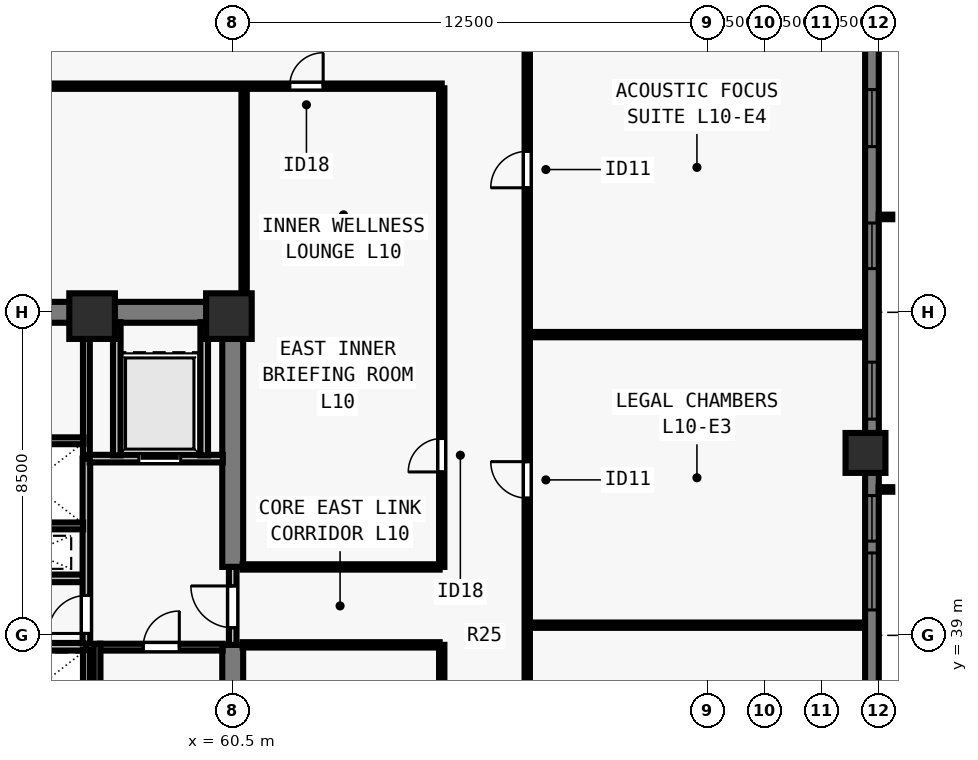
"""IFC4 building model, lengths in metres.
Left out: names, types, materials, properties, quantities, classifications, styles, units other than length and angle.
Written with IfcOpenShell. Run it as: python <this file> out.ifc"""

import sys

from ifc_helpers import new_model, si_unit, direction, frame, frame_2d, origin, origin_2d, place, context, subcontext, project, spatial, rectangle, extrude, element, fill, save


model = new_model("IFC4")
c1 = context("Model", 3, precision=1e-05, world=origin(), true_north=direction((0.0, 1.0)))
c2 = subcontext(c1, "Body", "Model", "MODEL_VIEW")
j1 = project(units=[si_unit("LENGTHUNIT", "METRE"), si_unit("PLANEANGLEUNIT", "RADIAN")], contexts=[c1])
p1 = place(None, origin())
s1 = spatial("IfcSite", under=j1, at=p1, CompositionType="ELEMENT")
p2 = place(p1, origin())
s2 = spatial("IfcBuilding", under=s1, at=p2, CompositionType="ELEMENT")
p3 = place(p2, frame((0.0, 0.0, 41.0)))
s3 = spatial("IfcBuildingStorey", under=s2, at=p3, CompositionType="ELEMENT", Elevation=41.0)
for number, where, z_axis, x_axis in (
    (1, (56.8, 47.4, 0.0), (0.0, 0.0, 1.0), (1.0, 0.0, 0.0)),
    (2, (60.4, 47.4, 0.0), (0.0, 0.0, 1.0), (1.0, 0.0, 0.0)),
):
    element("IfcColumn", number, at=place(p3, frame(where, z_axis=z_axis, x_axis=x_axis)), inside=s3, PredefinedType="COLUMN", context=c2, shape_type="SweptSolid", body=[
        extrude(rectangle(XDim=1.2, YDim=1.2, at=origin_2d()), origin(), (0.0, 0.0, 1.0), 3.5),
    ])
p4 = place(p3, frame((77.15, 43.8, 0.0), z_axis=(0.0, 0.0, 1.0), x_axis=(0.0, 1.0, 0.0)))
e3 = element("IfcColumn", 3, at=p4, inside=s3, PredefinedType="COLUMN", context=c2, shape_type="SweptSolid", body=[
    extrude(rectangle(XDim=1.05, YDim=1.05, at=origin_2d()), origin(), (0.0, 0.0, 1.0), 3.5),
])
p5 = place(p3, frame((77.32, 61.5, 0.0), z_axis=(0.0, 0.0, 1.0), x_axis=(0.0, -1.0, 0.0)))
e4 = element("IfcWall", 4, at=p5, inside=s3, PredefinedType="SOLIDWALL", context=c2, shape_type="SweptSolid", body=[
    extrude(rectangle(XDim=44.662, YDim=0.36, at=frame_2d((22.331, 0.0))), origin(), (0.0, 0.0, 1.0), 3.28),
])
p6 = place(p5, frame((4.93, 0.0, 0.8)))
e5 = element("IfcOpeningElement", 5, at=p6, cuts=e4, PredefinedType="OPENING", context=c2, shape_type="SweptSolid", body=[
    extrude(rectangle(XDim=1.2, YDim=1.544, at=frame_2d((0.6, 0.772))), frame((0.0, 0.19, 0.0), z_axis=(0.0, -1.0, 0.0), x_axis=(1.0, 0.0, 0.0)), (0.0, 0.0, 1.0), 0.38),
])
p7 = place(p5, frame((8.14, 0.0, 0.8)))
e6 = element("IfcOpeningElement", 6, at=p7, cuts=e4, PredefinedType="OPENING", context=c2, shape_type="SweptSolid", body=[
    extrude(rectangle(XDim=1.5, YDim=1.544, at=frame_2d((0.75, 0.772))), frame((0.0, 0.19, 0.0), z_axis=(0.0, -1.0, 0.0), x_axis=(1.0, 0.0, 0.0)), (0.0, 0.0, 1.0), 0.38),
])
p8 = place(p5, frame((11.65, 0.0, 0.8)))
e7 = element("IfcOpeningElement", 7, at=p8, cuts=e4, PredefinedType="OPENING", context=c2, shape_type="SweptSolid", body=[
    extrude(rectangle(XDim=1.2, YDim=1.544, at=frame_2d((0.6, 0.772))), frame((0.0, 0.19, 0.0), z_axis=(0.0, -1.0, 0.0), x_axis=(1.0, 0.0, 0.0)), (0.0, 0.0, 1.0), 0.38),
])
p9 = place(p5, frame((15.311, 0.0, 0.8)))
e8 = element("IfcOpeningElement", 8, at=p9, cuts=e4, PredefinedType="OPENING", context=c2, shape_type="SweptSolid", body=[
    extrude(rectangle(XDim=1.5, YDim=1.544, at=frame_2d((0.75, 0.772))), frame((0.0, 0.19, 0.0), z_axis=(0.0, -1.0, 0.0), x_axis=(1.0, 0.0, 0.0)), (0.0, 0.0, 1.0), 0.38),
])
p10 = place(p5, frame((18.821, 0.0, 0.8)))
e9 = element("IfcOpeningElement", 9, at=p10, cuts=e4, PredefinedType="OPENING", context=c2, shape_type="SweptSolid", body=[
    extrude(rectangle(XDim=1.2, YDim=1.544, at=frame_2d((0.6, 0.772))), frame((0.0, 0.19, 0.0), z_axis=(0.0, -1.0, 0.0), x_axis=(1.0, 0.0, 0.0)), (0.0, 0.0, 1.0), 0.38),
])
p11 = place(p5, frame((20.331, 0.0, 0.8)))
e10 = element("IfcOpeningElement", 10, at=p11, cuts=e4, PredefinedType="OPENING", context=c2, shape_type="SweptSolid", body=[
    extrude(rectangle(XDim=1.5, YDim=1.544, at=frame_2d((0.75, 0.772))), frame((0.0, 0.19, 0.0), z_axis=(0.0, -1.0, 0.0), x_axis=(1.0, 0.0, 0.0)), (0.0, 0.0, 1.0), 0.38),
])
p12 = place(p5, frame((25.091, 0.0, 0.8)))
e11 = element("IfcOpeningElement", 11, at=p12, cuts=e4, PredefinedType="OPENING", context=c2, shape_type="SweptSolid", body=[
    extrude(rectangle(XDim=1.2, YDim=1.544, at=frame_2d((0.6, 0.772))), frame((0.0, 0.19, 0.0), z_axis=(0.0, -1.0, 0.0), x_axis=(1.0, 0.0, 0.0)), (0.0, 0.0, 1.0), 0.38),
])
p13 = place(p5, frame((28.302, 0.0, 0.8)))
e12 = element("IfcOpeningElement", 12, at=p13, cuts=e4, PredefinedType="OPENING", context=c2, shape_type="SweptSolid", body=[
    extrude(rectangle(XDim=1.5, YDim=1.544, at=frame_2d((0.75, 0.772))), frame((0.0, 0.19, 0.0), z_axis=(0.0, -1.0, 0.0), x_axis=(1.0, 0.0, 0.0)), (0.0, 0.0, 1.0), 0.38),
])
p14 = place(p5, frame((31.812, 0.0, 0.8)))
e13 = element("IfcOpeningElement", 13, at=p14, cuts=e4, PredefinedType="OPENING", context=c2, shape_type="SweptSolid", body=[
    extrude(rectangle(XDim=1.2, YDim=1.544, at=frame_2d((0.6, 0.772))), frame((0.0, 0.19, 0.0), z_axis=(0.0, -1.0, 0.0), x_axis=(1.0, 0.0, 0.0)), (0.0, 0.0, 1.0), 0.38),
])
p15 = place(p5, frame((35.022, 0.0, 0.8)))
e14 = element("IfcOpeningElement", 14, at=p15, cuts=e4, PredefinedType="OPENING", context=c2, shape_type="SweptSolid", body=[
    extrude(rectangle(XDim=1.5, YDim=1.544, at=frame_2d((0.75, 0.772))), frame((0.0, 0.19, 0.0), z_axis=(0.0, -1.0, 0.0), x_axis=(1.0, 0.0, 0.0)), (0.0, 0.0, 1.0), 0.38),
])
p16 = place(p5, frame((38.532, 0.0, 0.8)))
e15 = element("IfcOpeningElement", 15, at=p16, cuts=e4, PredefinedType="OPENING", context=c2, shape_type="SweptSolid", body=[
    extrude(rectangle(XDim=1.2, YDim=1.544, at=frame_2d((0.6, 0.772))), frame((0.0, 0.19, 0.0), z_axis=(0.0, -1.0, 0.0), x_axis=(1.0, 0.0, 0.0)), (0.0, 0.0, 1.0), 0.38),
])
p17 = place(p3, frame((43.225, 47.5, 0.0), z_axis=(0.0, 0.0, 1.0), x_axis=(1.0, 0.0, 0.0)))
e16 = element("IfcWall", 16, at=p17, inside=s3, PredefinedType="SHEAR", context=c2, shape_type="SweptSolid", body=[
    extrude(rectangle(XDim=17.55, YDim=0.55, at=frame_2d((8.775, 0.0))), origin(), (0.0, 0.0, 1.0), 3.28),
])
p18 = place(p3, frame((60.5, 30.765, 0.0), z_axis=(0.0, 0.0, 1.0), x_axis=(0.0, 1.0, 0.0)))
e17 = element("IfcWall", 17, at=p18, inside=s3, PredefinedType="SHEAR", context=c2, shape_type="SweptSolid", body=[
    extrude(rectangle(XDim=7.985, YDim=0.55, at=frame_2d((3.993, 0.0))), origin(), (0.0, 0.0, 1.0), 3.28),
])
p19 = place(p3, frame((60.5, 40.8, 0.0), z_axis=(0.0, 0.0, 1.0), x_axis=(0.0, 1.0, 0.0)))
e18 = element("IfcWall", 18, at=p19, inside=s3, PredefinedType="SHEAR", context=c2, shape_type="SweptSolid", body=[
    extrude(rectangle(XDim=6.435, YDim=0.55, at=frame_2d((3.218, 0.0))), origin(), (0.0, 0.0, 1.0), 3.28),
])
for number, where, z_axis, x_axis in (
    (19, (53.7, 38.7, 0.0), (0.0, 0.0, 1.0), (1.0, 0.0, 0.0)),
    (20, (53.7, 40.5, 0.0), (0.0, 0.0, 1.0), (1.0, 0.0, 0.0)),
):
    element("IfcWall", number, at=place(p3, frame(where, z_axis=z_axis, x_axis=x_axis)), inside=s3, PredefinedType="SOLIDWALL", context=c2, shape_type="SweptSolid", body=[
        extrude(rectangle(XDim=2.95, YDim=0.2, at=frame_2d((1.475, 0.0))), origin(), (0.0, 0.0, 1.0), 3.28),
    ])
p20 = place(p3, frame((60.5, 38.75, 0.0), z_axis=(0.0, 0.0, 1.0), x_axis=(0.0, 1.0, 0.0)))
e21 = element("IfcWall", 21, at=p20, inside=s3, PredefinedType="SOLIDWALL", context=c2, shape_type="SweptSolid", body=[
    extrude(rectangle(XDim=2.05, YDim=0.2, at=frame_2d((1.025, 0.0))), origin(), (0.0, 0.0, 1.0), 3.28),
])
p21 = place(p20, frame((0.45, 0.0, 0.0)))
e22 = element("IfcOpeningElement", 22, at=p21, cuts=e21, PredefinedType="OPENING", context=c2, shape_type="SweptSolid", body=[
    extrude(rectangle(XDim=1.1, YDim=2.15, at=frame_2d((0.55, 1.075))), frame((0.0, 0.11, 0.0), z_axis=(0.0, -1.0, 0.0), x_axis=(1.0, 0.0, 0.0)), (0.0, 0.0, 1.0), 0.22),
])
p22 = place(p3, frame((56.65, 38.785, 0.0), z_axis=(0.0, 0.0, 1.0), x_axis=(0.0, 1.0, 0.0)))
e23 = element("IfcWall", 23, at=p22, inside=s3, PredefinedType="SOLIDWALL", context=c2, shape_type="SweptSolid", body=[
    extrude(rectangle(XDim=4.865, YDim=0.2, at=frame_2d((2.433, 0.0))), origin(), (0.0, 0.0, 1.0), 3.28),
])
p23 = place(p22, frame((0.265, 0.0, 0.0)))
e24 = element("IfcOpeningElement", 24, at=p23, cuts=e23, PredefinedType="OPENING", context=c2, shape_type="SweptSolid", body=[
    extrude(rectangle(XDim=1.0, YDim=2.15, at=frame_2d((0.5, 1.075))), frame((0.0, 0.11, 0.0), z_axis=(0.0, -1.0, 0.0), x_axis=(1.0, 0.0, 0.0)), (0.0, 0.0, 1.0), 0.22),
])
p24 = place(p3, frame((56.735, 43.65, 0.0), z_axis=(0.0, 0.0, 1.0), x_axis=(1.0, 0.0, 0.0)))
e25 = element("IfcWall", 25, at=p24, inside=s3, PredefinedType="SOLIDWALL", context=c2, shape_type="SweptSolid", body=[
    extrude(rectangle(XDim=3.505, YDim=0.2, at=frame_2d((1.752, 0.0))), origin(), (0.0, 0.0, 1.0), 3.28),
])
p25 = place(p24, frame((1.295, 0.0, 0.0)))
e26 = element("IfcOpeningElement", 26, at=p25, cuts=e25, PredefinedType="OPENING", context=c2, shape_type="SweptSolid", body=[
    extrude(rectangle(XDim=1.1, YDim=2.2, at=frame_2d((0.55, 1.1))), frame((0.0, 0.11, 0.0), z_axis=(0.0, -1.0, 0.0), x_axis=(1.0, 0.0, 0.0)), (0.0, 0.0, 1.0), 0.22),
])
for number, where, z_axis, x_axis in (
    (27, (57.45, 43.735, 0.0), (0.0, 0.0, 1.0), (0.0, 1.0, 0.0)),
    (28, (59.75, 43.735, 0.0), (0.0, 0.0, 1.0), (0.0, 1.0, 0.0)),
):
    element("IfcWall", number, at=place(p3, frame(where, z_axis=z_axis, x_axis=x_axis)), inside=s3, PredefinedType="SOLIDWALL", context=c2, shape_type="SweptSolid", body=[
        extrude(rectangle(XDim=3.505, YDim=0.2, at=frame_2d((1.752, 0.0))), origin(), (0.0, 0.0, 1.0), 3.28),
    ])
p26 = place(p3, frame((56.65, 30.76, 0.0), z_axis=(0.0, 0.0, 1.0), x_axis=(0.0, 1.0, 0.0)))
e29 = element("IfcWall", 29, at=p26, inside=s3, PredefinedType="SOLIDWALL", context=c2, shape_type="SweptSolid", body=[
    extrude(rectangle(XDim=7.855, YDim=0.18, at=frame_2d((3.927, 0.0))), origin(), (0.0, 0.0, 1.0), 3.28),
])
p27 = place(p3, frame((56.65, 43.735, 0.0), z_axis=(0.0, 0.0, 1.0), x_axis=(0.0, 1.0, 0.0)))
e30 = element("IfcWall", 30, at=p27, inside=s3, PredefinedType="SOLIDWALL", context=c2, shape_type="SweptSolid", body=[
    extrude(rectangle(XDim=3.505, YDim=0.18, at=frame_2d((1.752, 0.0))), origin(), (0.0, 0.0, 1.0), 3.28),
])
p28 = place(p3, frame((53.785, 41.88, 0.0), z_axis=(0.0, 0.0, 1.0), x_axis=(1.0, 0.0, 0.0)))
e31 = element("IfcWall", 31, at=p28, inside=s3, PredefinedType="SOLIDWALL", context=c2, shape_type="SweptSolid", body=[
    extrude(rectangle(XDim=2.78, YDim=0.18, at=frame_2d((1.39, 0.0))), origin(), (0.0, 0.0, 1.0), 3.28),
])
p29 = place(p3, frame((53.785, 44.12, 0.0), z_axis=(0.0, 0.0, 1.0), x_axis=(1.0, 0.0, 0.0)))
e32 = element("IfcWall", 32, at=p29, inside=s3, PredefinedType="SOLIDWALL", context=c2, shape_type="SweptSolid", body=[
    extrude(rectangle(XDim=2.79, YDim=0.18, at=frame_2d((1.395, 0.0))), origin(), (0.0, 0.0, 1.0), 3.28),
])
p30 = place(p3, frame((68.25, 22.355, 0.0), z_axis=(0.0, 0.0, 1.0), x_axis=(0.0, 1.0, 0.0)))
e33 = element("IfcWall", 33, at=p30, inside=s3, PredefinedType="PARTITIONING", context=c2, shape_type="SweptSolid", body=[
    extrude(rectangle(XDim=33.29, YDim=0.14, at=frame_2d((16.645, 0.0))), origin(), (0.0, 0.0, 1.0), 3.28),
])
p31 = place(p30, frame((3.522, 0.0, 0.0)))
e34 = element("IfcOpeningElement", 34, at=p31, cuts=e33, PredefinedType="OPENING", context=c2, shape_type="SweptSolid", body=[
    extrude(rectangle(XDim=0.96, YDim=2.12, at=frame_2d((0.48, 1.06))), frame((0.0, 0.08, 0.0), z_axis=(0.0, -1.0, 0.0), x_axis=(1.0, 0.0, 0.0)), (0.0, 0.0, 1.0), 0.16),
])
p32 = place(p30, frame((11.956, 0.0, 0.0)))
e35 = element("IfcOpeningElement", 35, at=p32, cuts=e33, PredefinedType="OPENING", context=c2, shape_type="SweptSolid", body=[
    extrude(rectangle(XDim=0.96, YDim=2.12, at=frame_2d((0.48, 1.06))), frame((0.0, 0.08, 0.0), z_axis=(0.0, -1.0, 0.0), x_axis=(1.0, 0.0, 0.0)), (0.0, 0.0, 1.0), 0.16),
])
p33 = place(p30, frame((20.256, 0.0, 0.0)))
e36 = element("IfcOpeningElement", 36, at=p33, cuts=e33, PredefinedType="OPENING", context=c2, shape_type="SweptSolid", body=[
    extrude(rectangle(XDim=0.96, YDim=2.12, at=frame_2d((0.48, 1.06))), frame((0.0, 0.08, 0.0), z_axis=(0.0, -1.0, 0.0), x_axis=(1.0, 0.0, 0.0)), (0.0, 0.0, 1.0), 0.16),
])
p34 = place(p30, frame((28.422, 0.0, 0.0)))
e37 = element("IfcOpeningElement", 37, at=p34, cuts=e33, PredefinedType="OPENING", context=c2, shape_type="SweptSolid", body=[
    extrude(rectangle(XDim=0.96, YDim=2.12, at=frame_2d((0.48, 1.06))), frame((0.0, 0.08, 0.0), z_axis=(0.0, -1.0, 0.0), x_axis=(1.0, 0.0, 0.0)), (0.0, 0.0, 1.0), 0.16),
])
p35 = place(p3, frame((38.0, 53.45, 0.0), z_axis=(0.0, 0.0, 1.0), x_axis=(1.0, 0.0, 0.0)))
e38 = element("IfcWall", 38, at=p35, inside=s3, PredefinedType="PARTITIONING", context=c2, shape_type="SweptSolid", body=[
    extrude(rectangle(XDim=28.0, YDim=0.14, at=frame_2d((14.0, 0.0))), origin(), (0.0, 0.0, 1.0), 3.28),
])
p36 = place(p35, frame((2.2, 0.0, 0.0)))
e39 = element("IfcOpeningElement", 39, at=p36, cuts=e38, PredefinedType="OPENING", context=c2, shape_type="SweptSolid", body=[
    extrude(rectangle(XDim=0.88, YDim=2.1, at=frame_2d((0.44, 1.05))), frame((0.0, 0.08, 0.0), z_axis=(0.0, -1.0, 0.0), x_axis=(1.0, 0.0, 0.0)), (0.0, 0.0, 1.0), 0.16),
])
p37 = place(p35, frame((14.5, 0.0, 0.0)))
e40 = element("IfcOpeningElement", 40, at=p37, cuts=e38, PredefinedType="OPENING", context=c2, shape_type="SweptSolid", body=[
    extrude(rectangle(XDim=0.88, YDim=2.1, at=frame_2d((0.44, 1.05))), frame((0.0, 0.08, 0.0), z_axis=(0.0, -1.0, 0.0), x_axis=(1.0, 0.0, 0.0)), (0.0, 0.0, 1.0), 0.16),
])
p38 = place(p35, frame((24.0, 0.0, 0.0)))
e41 = element("IfcOpeningElement", 41, at=p38, cuts=e38, PredefinedType="OPENING", context=c2, shape_type="SweptSolid", body=[
    extrude(rectangle(XDim=0.88, YDim=2.1, at=frame_2d((0.44, 1.05))), frame((0.0, 0.08, 0.0), z_axis=(0.0, -1.0, 0.0), x_axis=(1.0, 0.0, 0.0)), (0.0, 0.0, 1.0), 0.16),
])
p39 = place(p3, frame((66.0, 24.605, 0.0), z_axis=(0.0, 0.0, 1.0), x_axis=(0.0, 1.0, 0.0)))
e42 = element("IfcWall", 42, at=p39, inside=s3, PredefinedType="PARTITIONING", context=c2, shape_type="SweptSolid", body=[
    extrude(rectangle(XDim=14.145, YDim=0.14, at=frame_2d((7.073, 0.0))), origin(), (0.0, 0.0, 1.0), 3.28),
])
p40 = place(p39, frame((2.445, 0.0, 0.0)))
e43 = element("IfcOpeningElement", 43, at=p40, cuts=e42, PredefinedType="OPENING", context=c2, shape_type="SweptSolid", body=[
    extrude(rectangle(XDim=0.88, YDim=2.1, at=frame_2d((0.44, 1.05))), frame((0.0, 0.08, 0.0), z_axis=(0.0, -1.0, 0.0), x_axis=(1.0, 0.0, 0.0)), (0.0, 0.0, 1.0), 0.16),
])
p41 = place(p3, frame((66.0, 40.8, 0.0), z_axis=(0.0, 0.0, 1.0), x_axis=(0.0, 1.0, 0.0)))
e44 = element("IfcWall", 44, at=p41, inside=s3, PredefinedType="PARTITIONING", context=c2, shape_type="SweptSolid", body=[
    extrude(rectangle(XDim=12.595, YDim=0.14, at=frame_2d((6.297, 0.0))), origin(), (0.0, 0.0, 1.0), 3.28),
])
p42 = place(p41, frame((2.5, 0.0, 0.0)))
e45 = element("IfcOpeningElement", 45, at=p42, cuts=e44, PredefinedType="OPENING", context=c2, shape_type="SweptSolid", body=[
    extrude(rectangle(XDim=0.88, YDim=2.1, at=frame_2d((0.44, 1.05))), frame((0.0, 0.08, 0.0), z_axis=(0.0, -1.0, 0.0), x_axis=(1.0, 0.0, 0.0)), (0.0, 0.0, 1.0), 0.16),
])
for number, where, z_axis, x_axis in (
    (46, (60.76, 38.75, 0.0), (0.0, 0.0, 1.0), (1.0, 0.0, 0.0)),
    (47, (60.76, 40.8, 0.0), (0.0, 0.0, 1.0), (1.0, 0.0, 0.0)),
):
    element("IfcWall", number, at=place(p3, frame(where, z_axis=z_axis, x_axis=x_axis)), inside=s3, PredefinedType="PARTITIONING", context=c2, shape_type="SweptSolid", body=[
        extrude(rectangle(XDim=5.185, YDim=0.14, at=frame_2d((2.593, 0.0))), origin(), (0.0, 0.0, 1.0), 3.28),
    ])
p43 = place(p3, frame((60.8, 47.76, 0.0), z_axis=(0.0, 0.0, 1.0), x_axis=(0.0, 1.0, 0.0)))
e48 = element("IfcWall", 48, at=p43, inside=s3, PredefinedType="PARTITIONING", context=c2, shape_type="SweptSolid", body=[
    extrude(rectangle(XDim=5.635, YDim=0.14, at=frame_2d((2.817, 0.0))), origin(), (0.0, 0.0, 1.0), 2.439),
])
for number, where, z_axis, x_axis in (
    (49, (68.35, 39.268, 0.0), (0.0, 0.0, 1.0), (1.0, 0.0, 0.0)),
    (50, (68.35, 46.913, 0.0), (0.0, 0.0, 1.0), (1.0, 0.0, 0.0)),
):
    element("IfcWall", number, at=place(p3, frame(where, z_axis=z_axis, x_axis=x_axis)), inside=s3, PredefinedType="PARTITIONING", context=c2, shape_type="SweptSolid", body=[
        extrude(rectangle(XDim=8.73, YDim=0.14, at=frame_2d((4.365, 0.0))), origin(), (0.0, 0.0, 1.0), 3.28),
    ])
p44 = place(p3, frame((57.005, 38.69, 0.0), z_axis=(0.0, 0.0, 1.0), x_axis=(1.0, 0.0, 0.0)))
e51 = element("IfcWall", 51, at=p44, inside=s3, PredefinedType="SOLIDWALL", context=c2, shape_type="SweptSolid", body=[
    extrude(rectangle(XDim=3.23, YDim=0.18, at=frame_2d((1.615, 0.0))), origin(), (0.0, 0.0, 1.0), 3.28),
])
p45 = place(p44, frame((1.14, 0.0, 0.0)))
e52 = element("IfcOpeningElement", 52, at=p45, cuts=e51, PredefinedType="OPENING", context=c2, shape_type="SweptSolid", body=[
    extrude(rectangle(XDim=0.95, YDim=2.15, at=frame_2d((0.475, 1.075))), frame((0.0, 0.1, 0.0), z_axis=(0.0, -1.0, 0.0), x_axis=(1.0, 0.0, 0.0)), (0.0, 0.0, 1.0), 0.2),
])
p46 = place(p3, frame((56.93, 38.78, 0.0), z_axis=(0.0, 0.0, 1.0), x_axis=(0.0, -1.0, 0.0)))
e53 = element("IfcWall", 53, at=p46, inside=s3, PredefinedType="SOLIDWALL", context=c2, shape_type="SweptSolid", body=[
    extrude(rectangle(XDim=8.017, YDim=0.18, at=frame_2d((4.009, 0.0))), origin(), (0.0, 0.0, 1.0), 3.28),
])
p47 = place(p7, origin())
e54 = element("IfcWindow", 54, at=p47, inside=s3, PartitioningType="SINGLE_PANEL", PredefinedType="WINDOW", context=c2, shape_type="SweptSolid", body=[
    extrude(rectangle(XDim=1.5, YDim=1.544, at=frame_2d((0.75, 0.772))), frame((0.0, -0.05, 0.0), z_axis=(0.0, -1.0, 0.0), x_axis=(1.0, 0.0, 0.0)), (0.0, 0.0, 1.0), 0.06),
])
fill(e6, e54)
p48 = place(p8, origin())
e55 = element("IfcWindow", 55, at=p48, inside=s3, PartitioningType="SINGLE_PANEL", PredefinedType="WINDOW", context=c2, shape_type="SweptSolid", body=[
    extrude(rectangle(XDim=1.2, YDim=1.544, at=frame_2d((0.6, 0.772))), frame((0.0, -0.05, 0.0), z_axis=(0.0, -1.0, 0.0), x_axis=(1.0, 0.0, 0.0)), (0.0, 0.0, 1.0), 0.06),
])
fill(e7, e55)
p49 = place(p9, origin())
e56 = element("IfcWindow", 56, at=p49, inside=s3, PartitioningType="SINGLE_PANEL", PredefinedType="WINDOW", context=c2, shape_type="SweptSolid", body=[
    extrude(rectangle(XDim=1.5, YDim=1.544, at=frame_2d((0.75, 0.772))), frame((0.0, -0.05, 0.0), z_axis=(0.0, -1.0, 0.0), x_axis=(1.0, 0.0, 0.0)), (0.0, 0.0, 1.0), 0.06),
])
fill(e8, e56)
p50 = place(p10, origin())
e57 = element("IfcWindow", 57, at=p50, inside=s3, PartitioningType="SINGLE_PANEL", PredefinedType="WINDOW", context=c2, shape_type="SweptSolid", body=[
    extrude(rectangle(XDim=1.2, YDim=1.544, at=frame_2d((0.6, 0.772))), frame((0.0, -0.05, 0.0), z_axis=(0.0, -1.0, 0.0), x_axis=(1.0, 0.0, 0.0)), (0.0, 0.0, 1.0), 0.06),
])
fill(e9, e57)
p51 = place(p11, origin())
e58 = element("IfcWindow", 58, at=p51, inside=s3, PartitioningType="SINGLE_PANEL", PredefinedType="WINDOW", context=c2, shape_type="SweptSolid", body=[
    extrude(rectangle(XDim=1.5, YDim=1.544, at=frame_2d((0.75, 0.772))), frame((0.0, -0.05, 0.0), z_axis=(0.0, -1.0, 0.0), x_axis=(1.0, 0.0, 0.0)), (0.0, 0.0, 1.0), 0.06),
])
fill(e10, e58)
p52 = place(p21, origin())
e59 = element("IfcDoor", 59, at=p52, inside=s3, OperationType="SINGLE_SWING_RIGHT", PredefinedType="DOOR", context=c2, shape_type="SweptSolid", body=[
    extrude(rectangle(XDim=1.1, YDim=2.15, at=frame_2d((0.55, 1.075))), frame((0.0, 0.025, 0.0), z_axis=(0.0, -1.0, 0.0), x_axis=(1.0, 0.0, 0.0)), (0.0, 0.0, 1.0), 0.05),
])
fill(e22, e59)
p53 = place(p23, origin())
e60 = element("IfcDoor", 60, at=p53, inside=s3, OperationType="SINGLE_SWING_LEFT", PredefinedType="DOOR", context=c2, shape_type="SweptSolid", body=[
    extrude(rectangle(XDim=1.0, YDim=2.15, at=frame_2d((0.5, 1.075))), frame((0.0, 0.025, 0.0), z_axis=(0.0, -1.0, 0.0), x_axis=(1.0, 0.0, 0.0)), (0.0, 0.0, 1.0), 0.05),
])
fill(e24, e60)
p54 = place(p25, origin())
e61 = element("IfcDoor", 61, at=p54, inside=s3, OperationType="SLIDING_TO_LEFT", PredefinedType="DOOR", context=c2, shape_type="SweptSolid", body=[
    extrude(rectangle(XDim=1.1, YDim=2.2, at=frame_2d((0.55, 1.1))), frame((0.0, 0.025, 0.0), z_axis=(0.0, -1.0, 0.0), x_axis=(1.0, 0.0, 0.0)), (0.0, 0.0, 1.0), 0.05),
])
fill(e26, e61)
p55 = place(p38, origin())
e62 = element("IfcDoor", 62, at=p55, inside=s3, OperationType="SINGLE_SWING_RIGHT", PredefinedType="DOOR", context=c2, shape_type="SweptSolid", body=[
    extrude(rectangle(XDim=0.88, YDim=2.1, at=frame_2d((0.44, 1.05))), frame((0.0, 0.025, 0.0), z_axis=(0.0, -1.0, 0.0), x_axis=(1.0, 0.0, 0.0)), (0.0, 0.0, 1.0), 0.05),
])
fill(e41, e62)
p56 = place(p42, origin())
e63 = element("IfcDoor", 63, at=p56, inside=s3, OperationType="SINGLE_SWING_LEFT", PredefinedType="DOOR", context=c2, shape_type="SweptSolid", body=[
    extrude(rectangle(XDim=0.88, YDim=2.1, at=frame_2d((0.44, 1.05))), frame((0.0, 0.025, 0.0), z_axis=(0.0, -1.0, 0.0), x_axis=(1.0, 0.0, 0.0)), (0.0, 0.0, 1.0), 0.05),
])
fill(e45, e63)
p57 = place(p33, origin())
e64 = element("IfcDoor", 64, at=p57, inside=s3, OperationType="SINGLE_SWING_RIGHT", PredefinedType="DOOR", context=c2, shape_type="SweptSolid", body=[
    extrude(rectangle(XDim=0.96, YDim=2.12, at=frame_2d((0.48, 1.06))), frame((0.0, 0.025, 0.0), z_axis=(0.0, -1.0, 0.0), x_axis=(1.0, 0.0, 0.0)), (0.0, 0.0, 1.0), 0.05),
])
fill(e36, e64)
p58 = place(p34, origin())
e65 = element("IfcDoor", 65, at=p58, inside=s3, OperationType="SINGLE_SWING_LEFT", PredefinedType="DOOR", context=c2, shape_type="SweptSolid", body=[
    extrude(rectangle(XDim=0.96, YDim=2.12, at=frame_2d((0.48, 1.06))), frame((0.0, 0.025, 0.0), z_axis=(0.0, -1.0, 0.0), x_axis=(1.0, 0.0, 0.0)), (0.0, 0.0, 1.0), 0.05),
])
fill(e37, e65)
p59 = place(p45, origin())
e66 = element("IfcDoor", 66, at=p59, inside=s3, OperationType="SINGLE_SWING_RIGHT", PredefinedType="DOOR", context=c2, shape_type="SweptSolid", body=[
    extrude(rectangle(XDim=0.95, YDim=2.15, at=frame_2d((0.475, 1.075))), frame((0.0, 0.025, 0.0), z_axis=(0.0, -1.0, 0.0), x_axis=(1.0, 0.0, 0.0)), (0.0, 0.0, 1.0), 0.05),
])
fill(e52, e66)
save(model, sys.argv[1])
